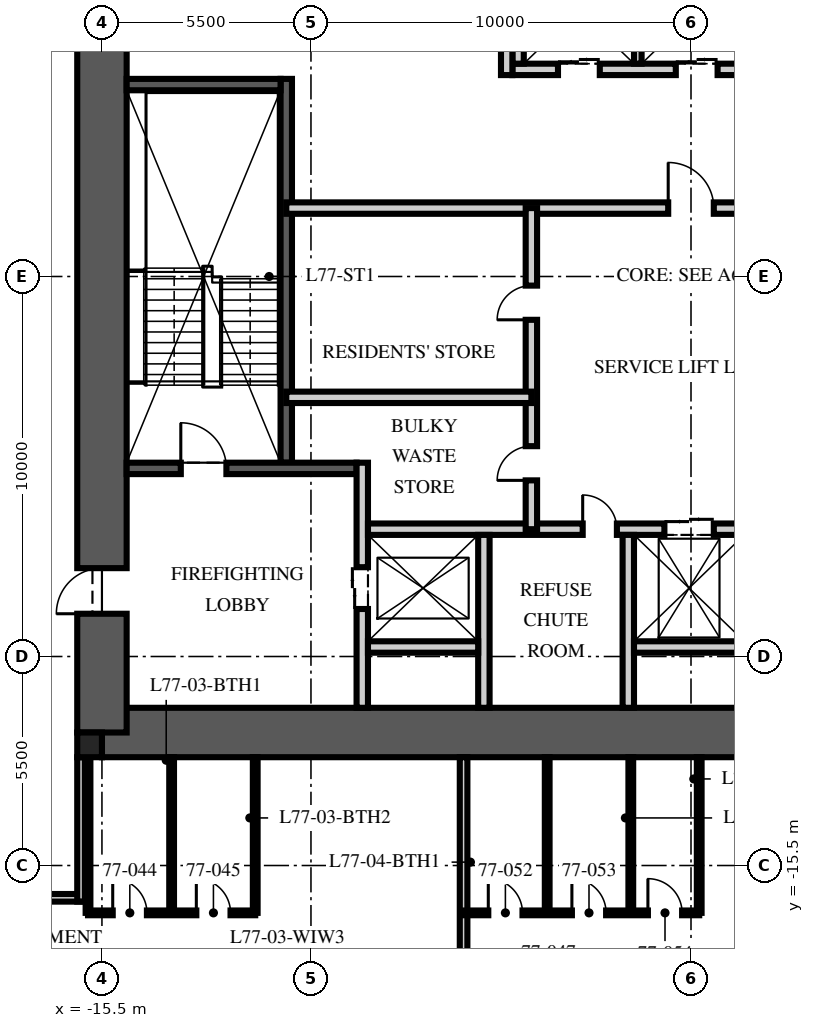
"""IFC4 building model, lengths in metres.
Left out: names, types, materials, properties, quantities, classifications, styles, units other than length and angle.
Written with IfcOpenShell. Run it as: python <this file> out.ifc"""

import sys

from ifc_helpers import new_model, si_unit, direction, frame, frame_2d, origin, origin_2d, place, context, subcontext, project, spatial, rectangle, extrude, element, fill, save


model = new_model("IFC4")
c1 = context("Model", 3, precision=1e-05, world=origin(), true_north=direction((0.0, 1.0)))
c2 = subcontext(c1, "Body", "Model", "MODEL_VIEW")
j1 = project(units=[si_unit("LENGTHUNIT", "METRE"), si_unit("PLANEANGLEUNIT", "RADIAN")], contexts=[c1])
p1 = place(None, origin())
s1 = spatial("IfcSite", under=j1, at=p1, CompositionType="ELEMENT")
p2 = place(p1, origin())
s2 = spatial("IfcBuilding", under=s1, at=p2, CompositionType="ELEMENT")
p3 = place(p2, frame((0.0, 0.0, 308.25)))
s3 = spatial("IfcBuildingStorey", under=s2, at=p3, CompositionType="ELEMENT", Elevation=308.25)
p4 = place(p3, frame((-15.5, -12.0, -0.25), z_axis=(0.0, 0.0, 1.0), x_axis=(1.0, 0.0, 0.0)))
e1 = element("IfcWall", 1, at=p4, inside=s3, PredefinedType="SHEAR", context=c2, shape_type="SweptSolid", body=[
    extrude(rectangle(XDim=31.0, YDim=1.3, at=frame_2d((15.5, 0.0))), origin(), (0.0, 0.0, 1.0), 3.75),
])
p5 = place(p3, frame((-15.5, -12.0, -0.25), z_axis=(0.0, 0.0, 1.0), x_axis=(0.0, 1.0, 0.0)))
e2 = element("IfcWall", 2, at=p5, inside=s3, PredefinedType="SHEAR", context=c2, shape_type="SweptSolid", body=[
    extrude(rectangle(XDim=24.0, YDim=1.3, at=frame_2d((12.0, 0.0))), origin(), (0.0, 0.0, 1.0), 3.75),
])
p6 = place(p5, frame((3.125, 0.0, 0.25)))
e3 = element("IfcOpeningElement", 3, at=p6, cuts=e2, PredefinedType="OPENING", context=c2, shape_type="SweptSolid", body=[
    extrude(rectangle(XDim=1.2, YDim=2.1, at=frame_2d((0.6, 1.05))), frame((0.0, 0.66, 0.0), z_axis=(0.0, -1.0, 0.0), x_axis=(1.0, 0.0, 0.0)), (0.0, 0.0, 1.0), 1.32),
])
p7 = place(p5, frame((19.375, 0.0, 0.25)))
e4 = element("IfcOpeningElement", 4, at=p7, cuts=e2, PredefinedType="OPENING", context=c2, shape_type="SweptSolid", body=[
    extrude(rectangle(XDim=1.8, YDim=2.1, at=frame_2d((0.9, 1.05))), frame((0.0, 0.66, 0.0), z_axis=(0.0, -1.0, 0.0), x_axis=(1.0, 0.0, 0.0)), (0.0, 0.0, 1.0), 1.32),
])
p8 = place(p3, frame((-15.825, -12.325, -0.25), z_axis=(0.0, 0.0, 1.0), x_axis=(1.0, 0.0, 0.0)))
e5 = element("IfcColumn", 5, at=p8, inside=s3, PredefinedType="COLUMN", context=c2, shape_type="SweptSolid", body=[
    extrude(rectangle(XDim=0.65, YDim=0.65, at=origin_2d()), origin(), (0.0, 0.0, 1.0), 3.75),
])
p9 = place(p3, frame((-10.65, -4.9, 0.0), z_axis=(0.0, 0.0, 1.0), x_axis=(0.0, 1.0, 0.0)))
e6 = element("IfcWall", 6, at=p9, inside=s3, PredefinedType="SOLIDWALL", context=c2, shape_type="SweptSolid", body=[
    extrude(rectangle(XDim=10.1, YDim=0.3, at=frame_2d((5.05, 0.0))), origin(), (0.0, 0.0, 1.0), 3.5),
])
p10 = place(p3, frame((-14.85, -5.05, 0.0), z_axis=(0.0, 0.0, 1.0), x_axis=(1.0, 0.0, 0.0)))
e7 = element("IfcWall", 7, at=p10, inside=s3, PredefinedType="SOLIDWALL", context=c2, shape_type="SweptSolid", body=[
    extrude(rectangle(XDim=6.05, YDim=0.3, at=frame_2d((3.025, 0.0))), origin(), (0.0, 0.0, 1.0), 3.5),
])
p11 = place(p10, frame((1.425, 0.0, 0.0)))
e8 = element("IfcOpeningElement", 8, at=p11, cuts=e7, PredefinedType="OPENING", context=c2, shape_type="SweptSolid", body=[
    extrude(rectangle(XDim=1.2, YDim=2.1, at=frame_2d((0.6, 1.05))), frame((0.0, 0.16, 0.0), z_axis=(0.0, -1.0, 0.0), x_axis=(1.0, 0.0, 0.0)), (0.0, 0.0, 1.0), 0.32),
])
p12 = place(p3, frame((-14.85, 5.05, 0.0), z_axis=(0.0, 0.0, 1.0), x_axis=(1.0, 0.0, 0.0)))
e9 = element("IfcWall", 9, at=p12, inside=s3, PredefinedType="SOLIDWALL", context=c2, shape_type="SweptSolid", body=[
    extrude(rectangle(XDim=4.05, YDim=0.3, at=frame_2d((2.025, 0.0))), origin(), (0.0, 0.0, 1.0), 3.5),
])
p13 = place(p3, frame((-8.65, -11.35, 0.0), z_axis=(0.0, 0.0, 1.0), x_axis=(0.0, 1.0, 0.0)))
e10 = element("IfcWall", 10, at=p13, inside=s3, PredefinedType="PARTITIONING", context=c2, shape_type="SweptSolid", body=[
    extrude(rectangle(XDim=6.45, YDim=0.3, at=frame_2d((3.225, 0.0))), origin(), (0.0, 0.0, 1.0), 3.5),
])
p14 = place(p13, frame((2.6, 0.0, 0.0)))
e11 = element("IfcOpeningElement", 11, at=p14, cuts=e10, PredefinedType="OPENING", context=c2, shape_type="SweptSolid", body=[
    extrude(rectangle(XDim=1.1, YDim=2.1, at=frame_2d((0.55, 1.05))), frame((0.0, 0.16, 0.0), z_axis=(0.0, -1.0, 0.0), x_axis=(1.0, 0.0, 0.0)), (0.0, 0.0, 1.0), 0.32),
])
p15 = place(p3, frame((-8.5, -6.65, 0.0), z_axis=(0.0, 0.0, 1.0), x_axis=(1.0, 0.0, 0.0)))
e12 = element("IfcWall", 12, at=p15, inside=s3, PredefinedType="PARTITIONING", context=c2, shape_type="SweptSolid", body=[
    extrude(rectangle(XDim=17.0, YDim=0.3, at=frame_2d((8.5, 0.0))), origin(), (0.0, 0.0, 1.0), 3.5),
])
p16 = place(p15, frame((7.8, 0.0, 0.0)))
e13 = element("IfcOpeningElement", 13, at=p16, cuts=e12, PredefinedType="OPENING", context=c2, shape_type="SweptSolid", body=[
    extrude(rectangle(XDim=1.3, YDim=2.4, at=frame_2d((0.65, 1.2))), frame((0.0, 0.16, 0.0), z_axis=(0.0, -1.0, 0.0), x_axis=(1.0, 0.0, 0.0)), (0.0, 0.0, 1.0), 0.32),
])
p17 = place(p15, frame((5.65, 0.0, 0.0)))
e14 = element("IfcOpeningElement", 14, at=p17, cuts=e12, PredefinedType="OPENING", context=c2, shape_type="SweptSolid", body=[
    extrude(rectangle(XDim=0.9, YDim=2.1, at=frame_2d((0.45, 1.05))), frame((0.0, 0.16, 0.0), z_axis=(0.0, -1.0, 0.0), x_axis=(1.0, 0.0, 0.0)), (0.0, 0.0, 1.0), 0.32),
])
p18 = place(p15, frame((10.4, 0.0, 0.0)))
e15 = element("IfcOpeningElement", 15, at=p18, cuts=e12, PredefinedType="OPENING", context=c2, shape_type="SweptSolid", body=[
    extrude(rectangle(XDim=0.9, YDim=2.1, at=frame_2d((0.45, 1.05))), frame((0.0, 0.16, 0.0), z_axis=(0.0, -1.0, 0.0), x_axis=(1.0, 0.0, 0.0)), (0.0, 0.0, 1.0), 0.32),
])
for number, where, z_axis, x_axis in (
    (16, (-5.45, -11.35, 0.0), (0.0, 0.0, 1.0), (0.0, 1.0, 0.0)),
    (17, (-1.65, -11.35, 0.0), (0.0, 0.0, 1.0), (0.0, 1.0, 0.0)),
):
    element("IfcWall", number, at=place(p3, frame(where, z_axis=z_axis, x_axis=x_axis)), inside=s3, PredefinedType="PARTITIONING", context=c2, shape_type="SweptSolid", body=[
        extrude(rectangle(XDim=4.55, YDim=0.3, at=frame_2d((2.275, 0.0))), origin(), (0.0, 0.0, 1.0), 3.5),
    ])
for number, where, z_axis, x_axis in (
    (18, (-8.5, -9.75, 0.0), (0.0, 0.0, 1.0), (1.0, 0.0, 0.0)),
    (19, (-1.5, -9.75, 0.0), (0.0, 0.0, 1.0), (1.0, 0.0, 0.0)),
):
    element("IfcWall", number, at=place(p3, frame(where, z_axis=z_axis, x_axis=x_axis)), inside=s3, PredefinedType="PARTITIONING", context=c2, shape_type="SweptSolid", body=[
        extrude(rectangle(XDim=2.9, YDim=0.3, at=frame_2d((1.45, 0.0))), origin(), (0.0, 0.0, 1.0), 3.5),
    ])
p19 = place(p3, frame((-4.7, 5.45, 0.0), z_axis=(0.0, 0.0, 1.0), x_axis=(1.0, 0.0, 0.0)))
e20 = element("IfcWall", 20, at=p19, inside=s3, PredefinedType="PARTITIONING", context=c2, shape_type="SweptSolid", body=[
    extrude(rectangle(XDim=9.7, YDim=0.3, at=frame_2d((4.85, 0.0))), origin(), (0.0, 0.0, 1.0), 3.5),
])
p20 = place(p19, frame((1.2, 0.0, 0.0)))
e21 = element("IfcOpeningElement", 21, at=p20, cuts=e20, PredefinedType="OPENING", context=c2, shape_type="SweptSolid", body=[
    extrude(rectangle(XDim=1.1, YDim=2.1, at=frame_2d((0.55, 1.05))), frame((0.0, 0.16, 0.0), z_axis=(0.0, -1.0, 0.0), x_axis=(1.0, 0.0, 0.0)), (0.0, 0.0, 1.0), 0.32),
])
p21 = place(p19, frame((4.3, 0.0, 0.0)))
e22 = element("IfcOpeningElement", 22, at=p21, cuts=e20, PredefinedType="OPENING", context=c2, shape_type="SweptSolid", body=[
    extrude(rectangle(XDim=1.1, YDim=2.1, at=frame_2d((0.55, 1.05))), frame((0.0, 0.16, 0.0), z_axis=(0.0, -1.0, 0.0), x_axis=(1.0, 0.0, 0.0)), (0.0, 0.0, 1.0), 0.32),
])
p22 = place(p19, frame((7.4, 0.0, 0.0)))
e23 = element("IfcOpeningElement", 23, at=p22, cuts=e20, PredefinedType="OPENING", context=c2, shape_type="SweptSolid", body=[
    extrude(rectangle(XDim=1.1, YDim=2.1, at=frame_2d((0.55, 1.05))), frame((0.0, 0.16, 0.0), z_axis=(0.0, -1.0, 0.0), x_axis=(1.0, 0.0, 0.0)), (0.0, 0.0, 1.0), 0.32),
])
p23 = place(p3, frame((-4.55, 5.6, 0.0), z_axis=(0.0, 0.0, 1.0), x_axis=(0.0, 1.0, 0.0)))
e24 = element("IfcWall", 24, at=p23, inside=s3, PredefinedType="PARTITIONING", context=c2, shape_type="SweptSolid", body=[
    extrude(rectangle(XDim=2.8, YDim=0.3, at=frame_2d((1.4, 0.0))), origin(), (0.0, 0.0, 1.0), 3.5),
])
p24 = place(p3, frame((-1.4, 5.6, 0.0), z_axis=(0.0, 0.0, 1.0), x_axis=(0.0, 1.0, 0.0)))
e25 = element("IfcWall", 25, at=p24, inside=s3, PredefinedType="PARTITIONING", context=c2, shape_type="SweptSolid", body=[
    extrude(rectangle(XDim=2.8, YDim=0.2, at=frame_2d((1.4, 0.0))), origin(), (0.0, 0.0, 1.0), 3.5),
])
p25 = place(p3, frame((-10.65, 1.8, 0.0), z_axis=(0.0, 0.0, 1.0), x_axis=(1.0, 0.0, 0.0)))
e26 = element("IfcWall", 26, at=p25, inside=s3, PredefinedType="PARTITIONING", context=c2, shape_type="SweptSolid", body=[
    extrude(rectangle(XDim=21.3, YDim=0.3, at=frame_2d((10.65, 0.0))), origin(), (0.0, 0.0, 1.0), 3.5),
])
p26 = place(p25, frame((10.05, 0.0, 0.0)))
e27 = element("IfcOpeningElement", 27, at=p26, cuts=e26, PredefinedType="OPENING", context=c2, shape_type="SweptSolid", body=[
    extrude(rectangle(XDim=1.2, YDim=2.1, at=frame_2d((0.6, 1.05))), frame((0.0, 0.16, 0.0), z_axis=(0.0, -1.0, 0.0), x_axis=(1.0, 0.0, 0.0)), (0.0, 0.0, 1.0), 0.32),
])
p27 = place(p25, frame((19.238, 0.0, 0.0)))
e28 = element("IfcOpeningElement", 28, at=p27, cuts=e26, PredefinedType="OPENING", context=c2, shape_type="SweptSolid", body=[
    extrude(rectangle(XDim=0.9, YDim=2.1, at=frame_2d((0.45, 1.05))), frame((0.0, 0.16, 0.0), z_axis=(0.0, -1.0, 0.0), x_axis=(1.0, 0.0, 0.0)), (0.0, 0.0, 1.0), 0.32),
])
p28 = place(p3, frame((-4.2, -6.65, 0.0), z_axis=(0.0, 0.0, 1.0), x_axis=(0.0, 1.0, 0.0)))
e29 = element("IfcWall", 29, at=p28, inside=s3, PredefinedType="PARTITIONING", context=c2, shape_type="SweptSolid", body=[
    extrude(rectangle(XDim=8.45, YDim=0.3, at=frame_2d((4.225, 0.0))), origin(), (0.0, 0.0, 1.0), 3.5),
])
p29 = place(p28, frame((1.285, 0.0, 0.0)))
e30 = element("IfcOpeningElement", 30, at=p29, cuts=e29, PredefinedType="OPENING", context=c2, shape_type="SweptSolid", body=[
    extrude(rectangle(XDim=0.9, YDim=2.1, at=frame_2d((0.45, 1.05))), frame((0.0, 0.16, 0.0), z_axis=(0.0, -1.0, 0.0), x_axis=(1.0, 0.0, 0.0)), (0.0, 0.0, 1.0), 0.32),
])
p30 = place(p28, frame((5.51, 0.0, 0.0)))
e31 = element("IfcOpeningElement", 31, at=p30, cuts=e29, PredefinedType="OPENING", context=c2, shape_type="SweptSolid", body=[
    extrude(rectangle(XDim=0.9, YDim=2.1, at=frame_2d((0.45, 1.05))), frame((0.0, 0.16, 0.0), z_axis=(0.0, -1.0, 0.0), x_axis=(1.0, 0.0, 0.0)), (0.0, 0.0, 1.0), 0.32),
])
p31 = place(p3, frame((-10.65, -3.18, 0.0), z_axis=(0.0, 0.0, 1.0), x_axis=(1.0, 0.0, 0.0)))
e32 = element("IfcWall", 32, at=p31, inside=s3, PredefinedType="PARTITIONING", context=c2, shape_type="SweptSolid", body=[
    extrude(rectangle(XDim=6.45, YDim=0.3, at=frame_2d((3.225, 0.0))), origin(), (0.0, 0.0, 1.0), 3.5),
])
p32 = place(p3, frame((-4.85, 5.3, 0.0), z_axis=(0.0, 0.0, 1.0), x_axis=(0.0, 1.0, 0.0)))
e33 = element("IfcWall", 33, at=p32, inside=s3, PredefinedType="PARTITIONING", context=c2, shape_type="SweptSolid", body=[
    extrude(rectangle(XDim=6.05, YDim=0.3, at=frame_2d((3.025, 0.0))), origin(), (0.0, 0.0, 1.0), 3.5),
])
p33 = place(p32, frame((4.225, 0.0, 0.0)))
e34 = element("IfcOpeningElement", 34, at=p33, cuts=e33, PredefinedType="OPENING", context=c2, shape_type="SweptSolid", body=[
    extrude(rectangle(XDim=0.9, YDim=2.1, at=frame_2d((0.45, 1.05))), frame((0.0, 0.16, 0.0), z_axis=(0.0, -1.0, 0.0), x_axis=(1.0, 0.0, 0.0)), (0.0, 0.0, 1.0), 0.32),
])
p34 = place(p3, frame((-19.15, -16.35, 0.0), z_axis=(0.0, 0.0, 1.0), x_axis=(1.0, 0.0, 0.0)))
e35 = element("IfcWall", 35, at=p34, inside=s3, PredefinedType="PARTITIONING", context=c2, shape_type="SweptSolid", body=[
    extrude(rectangle(XDim=3.2, YDim=0.2, at=frame_2d((1.6, 0.0))), origin(), (0.0, 0.0, 1.0), 2.6),
])
p35 = place(p3, frame((-16.05, -16.45, 0.0), z_axis=(0.0, 0.0, 1.0), x_axis=(0.0, 1.0, 0.0)))
e36 = element("IfcWall", 36, at=p35, inside=s3, PredefinedType="PARTITIONING", context=c2, shape_type="SweptSolid", body=[
    extrude(rectangle(XDim=3.8, YDim=0.2, at=frame_2d((1.9, 0.0))), origin(), (0.0, 0.0, 1.0), 2.6),
])
p36 = place(p3, frame((-5.984, -12.65, 0.0), z_axis=(0.0, 0.0, 1.0), x_axis=(0.0, -1.0, 0.0)))
e37 = element("IfcWall", 37, at=p36, inside=s3, PredefinedType="PARTITIONING", context=c2, shape_type="SweptSolid", body=[
    extrude(rectangle(XDim=10.85, YDim=0.2, at=frame_2d((5.425, 0.0))), origin(), (0.0, 0.0, 1.0), 3.01),
])
p37 = place(p3, frame((-15.866, -16.746, 0.0), z_axis=(0.0, 0.0, 1.0), x_axis=(1.0, 0.0, 0.0)))
e38 = element("IfcWall", 38, at=p37, inside=s3, PredefinedType="PARTITIONING", context=c2, shape_type="SweptSolid", body=[
    extrude(rectangle(XDim=4.4, YDim=0.125, at=frame_2d((2.2, 0.0))), origin(), (0.0, 0.0, 1.0), 2.9),
])
p38 = place(p37, frame((0.65, 0.0, 0.0)))
e39 = element("IfcOpeningElement", 39, at=p38, cuts=e38, PredefinedType="OPENING", context=c2, shape_type="SweptSolid", body=[
    extrude(rectangle(XDim=0.9, YDim=2.1, at=frame_2d((0.45, 1.05))), frame((0.0, 0.073, 0.0), z_axis=(0.0, -1.0, 0.0), x_axis=(1.0, 0.0, 0.0)), (0.0, 0.0, 1.0), 0.145),
])
p39 = place(p37, frame((2.85, 0.0, 0.0)))
e40 = element("IfcOpeningElement", 40, at=p39, cuts=e38, PredefinedType="OPENING", context=c2, shape_type="SweptSolid", body=[
    extrude(rectangle(XDim=0.9, YDim=2.1, at=frame_2d((0.45, 1.05))), frame((0.0, 0.073, 0.0), z_axis=(0.0, -1.0, 0.0), x_axis=(1.0, 0.0, 0.0)), (0.0, 0.0, 1.0), 0.145),
])
p40 = place(p3, frame((-15.866, -12.65, 0.0), z_axis=(0.0, 0.0, 1.0), x_axis=(0.0, -1.0, 0.0)))
e41 = element("IfcWall", 41, at=p40, inside=s3, PredefinedType="PARTITIONING", context=c2, shape_type="SweptSolid", body=[
    extrude(rectangle(XDim=4.096, YDim=0.125, at=frame_2d((2.048, 0.0))), origin(), (0.0, 0.0, 1.0), 2.6),
])
for number, where, z_axis, x_axis in (
    (42, (-13.667, -12.65, 0.0), (0.0, 0.0, 1.0), (0.0, -1.0, 0.0)),
    (43, (-11.467, -12.65, 0.0), (0.0, 0.0, 1.0), (0.0, -1.0, 0.0)),
):
    element("IfcWall", number, at=place(p3, frame(where, z_axis=z_axis, x_axis=x_axis)), inside=s3, PredefinedType="PARTITIONING", context=c2, shape_type="SweptSolid", body=[
        extrude(rectangle(XDim=4.096, YDim=0.125, at=frame_2d((2.048, 0.0))), origin(), (0.0, 0.0, 1.0), 3.5),
    ])
p41 = place(p3, frame((-5.984, -16.746, 0.0), z_axis=(0.0, 0.0, 1.0), x_axis=(1.0, 0.0, 0.0)))
e44 = element("IfcWall", 44, at=p41, inside=s3, PredefinedType="PARTITIONING", context=c2, shape_type="SweptSolid", body=[
    extrude(rectangle(XDim=6.2, YDim=0.125, at=frame_2d((3.1, 0.0))), origin(), (0.0, 0.0, 1.0), 2.9),
])
p42 = place(p41, frame((0.65, 0.0, 0.0)))
e45 = element("IfcOpeningElement", 45, at=p42, cuts=e44, PredefinedType="OPENING", context=c2, shape_type="SweptSolid", body=[
    extrude(rectangle(XDim=0.9, YDim=2.1, at=frame_2d((0.45, 1.05))), frame((0.0, 0.073, 0.0), z_axis=(0.0, -1.0, 0.0), x_axis=(1.0, 0.0, 0.0)), (0.0, 0.0, 1.0), 0.145),
])
p43 = place(p41, frame((2.85, 0.0, 0.0)))
e46 = element("IfcOpeningElement", 46, at=p43, cuts=e44, PredefinedType="OPENING", context=c2, shape_type="SweptSolid", body=[
    extrude(rectangle(XDim=0.9, YDim=2.1, at=frame_2d((0.45, 1.05))), frame((0.0, 0.073, 0.0), z_axis=(0.0, -1.0, 0.0), x_axis=(1.0, 0.0, 0.0)), (0.0, 0.0, 1.0), 0.145),
])
p44 = place(p41, frame((4.85, 0.0, 0.0)))
e47 = element("IfcOpeningElement", 47, at=p44, cuts=e44, PredefinedType="OPENING", context=c2, shape_type="SweptSolid", body=[
    extrude(rectangle(XDim=0.9, YDim=2.1, at=frame_2d((0.45, 1.05))), frame((0.0, 0.073, 0.0), z_axis=(0.0, -1.0, 0.0), x_axis=(1.0, 0.0, 0.0)), (0.0, 0.0, 1.0), 0.145),
])
p45 = place(p3, frame((-3.784, -12.65, 0.0), z_axis=(0.0, 0.0, 1.0), x_axis=(0.0, -1.0, 0.0)))
e48 = element("IfcWall", 48, at=p45, inside=s3, PredefinedType="PARTITIONING", context=c2, shape_type="SweptSolid", body=[
    extrude(rectangle(XDim=4.096, YDim=0.125, at=frame_2d((2.048, 0.0))), origin(), (0.0, 0.0, 1.0), 2.91),
])
for number, where, z_axis, x_axis in (
    (49, (-1.584, -12.65, 0.0), (0.0, 0.0, 1.0), (0.0, -1.0, 0.0)),
    (50, (0.216, -12.65, 0.0), (0.0, 0.0, 1.0), (0.0, -1.0, 0.0)),
):
    element("IfcWall", number, at=place(p3, frame(where, z_axis=z_axis, x_axis=x_axis)), inside=s3, PredefinedType="PARTITIONING", context=c2, shape_type="SweptSolid", body=[
        extrude(rectangle(XDim=4.096, YDim=0.125, at=frame_2d((2.048, 0.0))), origin(), (0.0, 0.0, 1.0), 3.5),
    ])
p46 = place(p11, origin())
e51 = element("IfcDoor", 51, at=p46, inside=s3, OperationType="SINGLE_SWING_LEFT", PredefinedType="DOOR", context=c2, shape_type="SweptSolid", body=[
    extrude(rectangle(XDim=1.2, YDim=2.1, at=frame_2d((0.6, 1.05))), frame((0.0, 0.025, 0.0), z_axis=(0.0, -1.0, 0.0), x_axis=(1.0, 0.0, 0.0)), (0.0, 0.0, 1.0), 0.05),
])
fill(e8, e51)
p47 = place(p6, origin())
e52 = element("IfcDoor", 52, at=p47, inside=s3, OperationType="SINGLE_SWING_LEFT", PredefinedType="DOOR", context=c2, shape_type="SweptSolid", body=[
    extrude(rectangle(XDim=1.2, YDim=2.1, at=frame_2d((0.6, 1.05))), frame((0.0, 0.025, 0.0), z_axis=(0.0, -1.0, 0.0), x_axis=(1.0, 0.0, 0.0)), (0.0, 0.0, 1.0), 0.05),
])
fill(e3, e52)
p48 = place(p14, origin())
e53 = element("IfcDoor", 53, at=p48, inside=s3, OperationType="DOUBLE_DOOR_SLIDING", PredefinedType="DOOR", context=c2, shape_type="SweptSolid", body=[
    extrude(rectangle(XDim=1.1, YDim=2.1, at=frame_2d((0.55, 1.05))), frame((0.0, 0.025, 0.0), z_axis=(0.0, -1.0, 0.0), x_axis=(1.0, 0.0, 0.0)), (0.0, 0.0, 1.0), 0.05),
])
fill(e11, e53)
p49 = place(p20, origin())
e54 = element("IfcDoor", 54, at=p49, inside=s3, OperationType="DOUBLE_DOOR_SLIDING", PredefinedType="DOOR", context=c2, shape_type="SweptSolid", body=[
    extrude(rectangle(XDim=1.1, YDim=2.1, at=frame_2d((0.55, 1.05))), frame((0.0, 0.025, 0.0), z_axis=(0.0, -1.0, 0.0), x_axis=(1.0, 0.0, 0.0)), (0.0, 0.0, 1.0), 0.05),
])
fill(e21, e54)
p50 = place(p21, origin())
e55 = element("IfcDoor", 55, at=p50, inside=s3, OperationType="DOUBLE_DOOR_SLIDING", PredefinedType="DOOR", context=c2, shape_type="SweptSolid", body=[
    extrude(rectangle(XDim=1.1, YDim=2.1, at=frame_2d((0.55, 1.05))), frame((0.0, 0.025, 0.0), z_axis=(0.0, -1.0, 0.0), x_axis=(1.0, 0.0, 0.0)), (0.0, 0.0, 1.0), 0.05),
])
fill(e22, e55)
p51 = place(p16, origin())
e56 = element("IfcDoor", 56, at=p51, inside=s3, OperationType="DOUBLE_DOOR_SLIDING", PredefinedType="DOOR", context=c2, shape_type="SweptSolid", body=[
    extrude(rectangle(XDim=1.3, YDim=2.4, at=frame_2d((0.65, 1.2))), frame((0.0, 0.025, 0.0), z_axis=(0.0, -1.0, 0.0), x_axis=(1.0, 0.0, 0.0)), (0.0, 0.0, 1.0), 0.05),
])
fill(e13, e56)
p52 = place(p26, origin())
e57 = element("IfcDoor", 57, at=p52, inside=s3, OperationType="SINGLE_SWING_LEFT", PredefinedType="DOOR", context=c2, shape_type="SweptSolid", body=[
    extrude(rectangle(XDim=1.2, YDim=2.1, at=frame_2d((0.6, 1.05))), frame((0.0, 0.025, 0.0), z_axis=(0.0, -1.0, 0.0), x_axis=(1.0, 0.0, 0.0)), (0.0, 0.0, 1.0), 0.05),
])
fill(e27, e57)
p53 = place(p17, origin())
e58 = element("IfcDoor", 58, at=p53, inside=s3, OperationType="SINGLE_SWING_LEFT", PredefinedType="DOOR", context=c2, shape_type="SweptSolid", body=[
    extrude(rectangle(XDim=0.9, YDim=2.1, at=frame_2d((0.45, 1.05))), frame((0.0, 0.025, 0.0), z_axis=(0.0, -1.0, 0.0), x_axis=(1.0, 0.0, 0.0)), (0.0, 0.0, 1.0), 0.05),
])
fill(e14, e58)
p54 = place(p29, origin())
e59 = element("IfcDoor", 59, at=p54, inside=s3, OperationType="SINGLE_SWING_LEFT", PredefinedType="DOOR", context=c2, shape_type="SweptSolid", body=[
    extrude(rectangle(XDim=0.9, YDim=2.1, at=frame_2d((0.45, 1.05))), frame((0.0, 0.025, 0.0), z_axis=(0.0, -1.0, 0.0), x_axis=(1.0, 0.0, 0.0)), (0.0, 0.0, 1.0), 0.05),
])
fill(e30, e59)
p55 = place(p30, origin())
e60 = element("IfcDoor", 60, at=p55, inside=s3, OperationType="SINGLE_SWING_LEFT", PredefinedType="DOOR", context=c2, shape_type="SweptSolid", body=[
    extrude(rectangle(XDim=0.9, YDim=2.1, at=frame_2d((0.45, 1.05))), frame((0.0, 0.025, 0.0), z_axis=(0.0, -1.0, 0.0), x_axis=(1.0, 0.0, 0.0)), (0.0, 0.0, 1.0), 0.05),
])
fill(e31, e60)
p56 = place(p38, origin())
e61 = element("IfcDoor", 61, at=p56, inside=s3, OperationType="SINGLE_SWING_LEFT", PredefinedType="DOOR", context=c2, shape_type="SweptSolid", body=[
    extrude(rectangle(XDim=0.9, YDim=2.1, at=frame_2d((0.45, 1.05))), frame((0.0, 0.025, 0.0), z_axis=(0.0, -1.0, 0.0), x_axis=(1.0, 0.0, 0.0)), (0.0, 0.0, 1.0), 0.05),
])
fill(e39, e61)
p57 = place(p39, origin())
e62 = element("IfcDoor", 62, at=p57, inside=s3, OperationType="SINGLE_SWING_LEFT", PredefinedType="DOOR", context=c2, shape_type="SweptSolid", body=[
    extrude(rectangle(XDim=0.9, YDim=2.1, at=frame_2d((0.45, 1.05))), frame((0.0, 0.025, 0.0), z_axis=(0.0, -1.0, 0.0), x_axis=(1.0, 0.0, 0.0)), (0.0, 0.0, 1.0), 0.05),
])
fill(e40, e62)
p58 = place(p42, origin())
e63 = element("IfcDoor", 63, at=p58, inside=s3, OperationType="SINGLE_SWING_LEFT", PredefinedType="DOOR", context=c2, shape_type="SweptSolid", body=[
    extrude(rectangle(XDim=0.9, YDim=2.1, at=frame_2d((0.45, 1.05))), frame((0.0, 0.025, 0.0), z_axis=(0.0, -1.0, 0.0), x_axis=(1.0, 0.0, 0.0)), (0.0, 0.0, 1.0), 0.05),
])
fill(e45, e63)
p59 = place(p43, origin())
e64 = element("IfcDoor", 64, at=p59, inside=s3, OperationType="SINGLE_SWING_LEFT", PredefinedType="DOOR", context=c2, shape_type="SweptSolid", body=[
    extrude(rectangle(XDim=0.9, YDim=2.1, at=frame_2d((0.45, 1.05))), frame((0.0, 0.025, 0.0), z_axis=(0.0, -1.0, 0.0), x_axis=(1.0, 0.0, 0.0)), (0.0, 0.0, 1.0), 0.05),
])
fill(e46, e64)
p60 = place(p44, origin())
e65 = element("IfcDoor", 65, at=p60, inside=s3, OperationType="SINGLE_SWING_LEFT", PredefinedType="DOOR", context=c2, shape_type="SweptSolid", body=[
    extrude(rectangle(XDim=0.9, YDim=2.1, at=frame_2d((0.45, 1.05))), frame((0.0, 0.025, 0.0), z_axis=(0.0, -1.0, 0.0), x_axis=(1.0, 0.0, 0.0)), (0.0, 0.0, 1.0), 0.05),
])
fill(e47, e65)
save(model, sys.argv[1])
